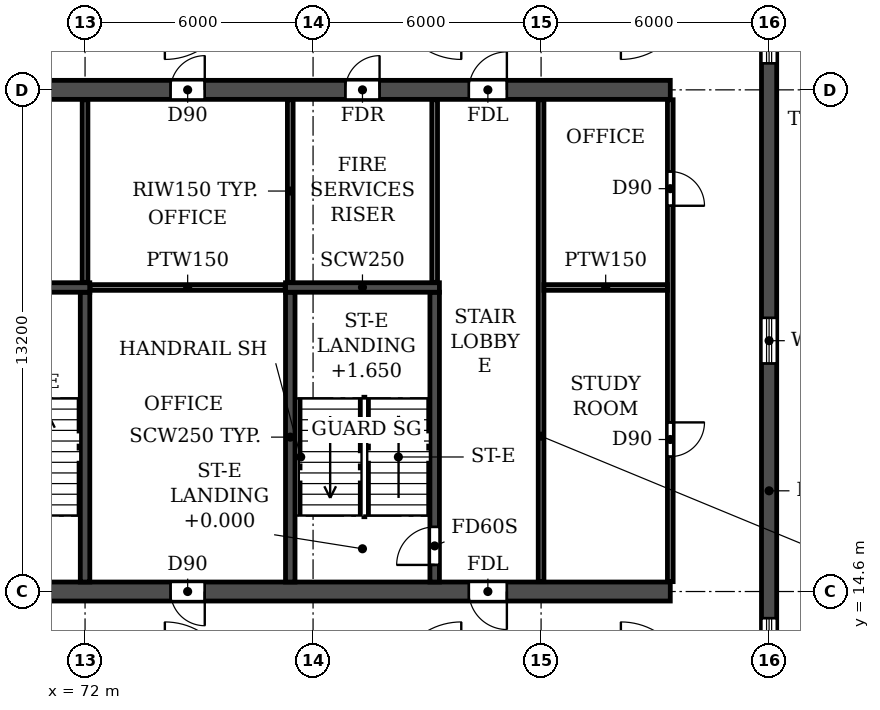
"""IFC4 building model, lengths in metres.
Left out: names, types, materials, properties, quantities, classifications, styles, units other than length and angle.
Written with IfcOpenShell. Run it as: python <this file> out.ifc"""

import sys

from ifc_helpers import new_model, si_unit, direction, frame, frame_2d, origin, place, context, subcontext, project, spatial, rectangle, extrude, element, fill, save


model = new_model("IFC4")
c1 = context("Model", 3, precision=1e-05, world=origin(), true_north=direction((0.0, 1.0)))
c2 = subcontext(c1, "Body", "Model", "MODEL_VIEW")
j1 = project(units=[si_unit("LENGTHUNIT", "METRE"), si_unit("PLANEANGLEUNIT", "RADIAN")], contexts=[c1])
p1 = place(None, origin())
s1 = spatial("IfcSite", under=j1, at=p1, CompositionType="ELEMENT")
p2 = place(p1, origin())
s2 = spatial("IfcBuilding", under=s1, at=p2, CompositionType="ELEMENT")
p3 = place(p2, frame((0.0, 0.0, 105.9)))
s3 = spatial("IfcBuildingStorey", under=s2, at=p3, CompositionType="ELEMENT", Elevation=105.9)
p4 = place(p3, frame((90.0, 4.683, 0.0), z_axis=(0.0, 0.0, 1.0), x_axis=(0.0, 1.0, 0.0)))
e1 = element("IfcWall", 1, at=p4, inside=s3, PredefinedType="SHEAR", context=c2, shape_type="SweptSolid", body=[
    extrude(rectangle(XDim=34.234, YDim=0.4, at=frame_2d((17.117, 0.0))), origin(), (0.0, 0.0, 1.0), 3.06),
])
p5 = place(p4, frame((15.917, 0.0, 0.9)))
e2 = element("IfcOpeningElement", 2, at=p5, cuts=e1, PredefinedType="OPENING", context=c2, shape_type="SweptSolid", body=[
    extrude(rectangle(XDim=1.2, YDim=1.5, at=frame_2d((0.6, 0.75))), frame((0.0, 0.21, 0.0), z_axis=(0.0, -1.0, 0.0), x_axis=(1.0, 0.0, 0.0)), (0.0, 0.0, 1.0), 0.42),
])
p6 = place(p4, frame((23.817, 0.0, 0.9)))
e3 = element("IfcOpeningElement", 3, at=p6, cuts=e1, PredefinedType="OPENING", context=c2, shape_type="SweptSolid", body=[
    extrude(rectangle(XDim=1.2, YDim=1.5, at=frame_2d((0.6, 0.75))), frame((0.0, 0.21, 0.0), z_axis=(0.0, -1.0, 0.0), x_axis=(1.0, 0.0, 0.0)), (0.0, 0.0, 1.0), 0.42),
])
p7 = place(p4, frame((8.017, 0.0, 0.9)))
e4 = element("IfcOpeningElement", 4, at=p7, cuts=e1, PredefinedType="OPENING", context=c2, shape_type="SweptSolid", body=[
    extrude(rectangle(XDim=1.2, YDim=1.5, at=frame_2d((0.6, 0.75))), frame((0.0, 0.21, 0.0), z_axis=(0.0, -1.0, 0.0), x_axis=(1.0, 0.0, 0.0)), (0.0, 0.0, 1.0), 0.42),
])
p8 = place(p4, frame((29.476, 0.0, 0.0)))
e5 = element("IfcOpeningElement", 5, at=p8, cuts=e1, PredefinedType="OPENING", context=c2, shape_type="SweptSolid", body=[
    extrude(rectangle(XDim=1.0, YDim=2.1, at=frame_2d((0.5, 1.05))), frame((0.0, 0.21, 0.0), z_axis=(0.0, -1.0, 0.0), x_axis=(1.0, 0.0, 0.0)), (0.0, 0.0, 1.0), 0.42),
])
p9 = place(p4, frame((3.159, 0.0, 0.0)))
e6 = element("IfcOpeningElement", 6, at=p9, cuts=e1, PredefinedType="OPENING", context=c2, shape_type="SweptSolid", body=[
    extrude(rectangle(XDim=1.0, YDim=2.1, at=frame_2d((0.5, 1.05))), frame((0.0, 0.21, 0.0), z_axis=(0.0, -1.0, 0.0), x_axis=(1.0, 0.0, 0.0)), (0.0, 0.0, 1.0), 0.42),
])
p10 = place(p3, frame((14.6, 14.6, 0.0), z_axis=(0.0, 0.0, 1.0), x_axis=(1.0, 0.0, 0.0)))
e7 = element("IfcWall", 7, at=p10, inside=s3, PredefinedType="SOLIDWALL", context=c2, shape_type="SweptSolid", body=[
    extrude(rectangle(XDim=72.8, YDim=0.5, at=frame_2d((36.4, 0.0))), origin(), (0.0, 0.0, 1.0), 3.06),
])
p11 = place(p10, frame((4.3, 0.0, 0.0)))
e8 = element("IfcOpeningElement", 8, at=p11, cuts=e7, PredefinedType="OPENING", context=c2, shape_type="SweptSolid", body=[
    extrude(rectangle(XDim=1.0, YDim=2.1, at=frame_2d((0.5, 1.05))), frame((0.0, 0.26, 0.0), z_axis=(0.0, -1.0, 0.0), x_axis=(1.0, 0.0, 0.0)), (0.0, 0.0, 1.0), 0.52),
])
p12 = place(p10, frame((12.25, 0.0, 0.0)))
e9 = element("IfcOpeningElement", 9, at=p12, cuts=e7, PredefinedType="OPENING", context=c2, shape_type="SweptSolid", body=[
    extrude(rectangle(XDim=0.9, YDim=2.1, at=frame_2d((0.45, 1.05))), frame((0.0, 0.26, 0.0), z_axis=(0.0, -1.0, 0.0), x_axis=(1.0, 0.0, 0.0)), (0.0, 0.0, 1.0), 0.52),
])
p13 = place(p10, frame((16.8, 0.0, 0.0)))
e10 = element("IfcOpeningElement", 10, at=p13, cuts=e7, PredefinedType="OPENING", context=c2, shape_type="SweptSolid", body=[
    extrude(rectangle(XDim=1.0, YDim=2.1, at=frame_2d((0.5, 1.05))), frame((0.0, 0.26, 0.0), z_axis=(0.0, -1.0, 0.0), x_axis=(1.0, 0.0, 0.0)), (0.0, 0.0, 1.0), 0.52),
])
p14 = place(p10, frame((30.7, 0.0, 0.0)))
e11 = element("IfcOpeningElement", 11, at=p14, cuts=e7, PredefinedType="OPENING", context=c2, shape_type="SweptSolid", body=[
    extrude(rectangle(XDim=1.0, YDim=2.1, at=frame_2d((0.5, 1.05))), frame((0.0, 0.26, 0.0), z_axis=(0.0, -1.0, 0.0), x_axis=(1.0, 0.0, 0.0)), (0.0, 0.0, 1.0), 0.52),
])
p15 = place(p10, frame((35.9, 0.0, 0.0)))
e12 = element("IfcOpeningElement", 12, at=p15, cuts=e7, PredefinedType="OPENING", context=c2, shape_type="SweptSolid", body=[
    extrude(rectangle(XDim=1.0, YDim=2.1, at=frame_2d((0.5, 1.05))), frame((0.0, 0.26, 0.0), z_axis=(0.0, -1.0, 0.0), x_axis=(1.0, 0.0, 0.0)), (0.0, 0.0, 1.0), 0.52),
])
p16 = place(p10, frame((39.8, 0.0, 0.0)))
e13 = element("IfcOpeningElement", 13, at=p16, cuts=e7, PredefinedType="OPENING", context=c2, shape_type="SweptSolid", body=[
    extrude(rectangle(XDim=1.0, YDim=2.1, at=frame_2d((0.5, 1.05))), frame((0.0, 0.26, 0.0), z_axis=(0.0, -1.0, 0.0), x_axis=(1.0, 0.0, 0.0)), (0.0, 0.0, 1.0), 0.52),
])
p17 = place(p10, frame((43.7, 0.0, 0.0)))
e14 = element("IfcOpeningElement", 14, at=p17, cuts=e7, PredefinedType="OPENING", context=c2, shape_type="SweptSolid", body=[
    extrude(rectangle(XDim=1.0, YDim=2.1, at=frame_2d((0.5, 1.05))), frame((0.0, 0.26, 0.0), z_axis=(0.0, -1.0, 0.0), x_axis=(1.0, 0.0, 0.0)), (0.0, 0.0, 1.0), 0.52),
])
p18 = place(p10, frame((55.0, 0.0, 0.0)))
e15 = element("IfcOpeningElement", 15, at=p18, cuts=e7, PredefinedType="OPENING", context=c2, shape_type="SweptSolid", body=[
    extrude(rectangle(XDim=1.0, YDim=2.1, at=frame_2d((0.5, 1.05))), frame((0.0, 0.26, 0.0), z_axis=(0.0, -1.0, 0.0), x_axis=(1.0, 0.0, 0.0)), (0.0, 0.0, 1.0), 0.52),
])
p19 = place(p10, frame((59.65, 0.0, 0.0)))
e16 = element("IfcOpeningElement", 16, at=p19, cuts=e7, PredefinedType="OPENING", context=c2, shape_type="SweptSolid", body=[
    extrude(rectangle(XDim=0.9, YDim=2.1, at=frame_2d((0.45, 1.05))), frame((0.0, 0.26, 0.0), z_axis=(0.0, -1.0, 0.0), x_axis=(1.0, 0.0, 0.0)), (0.0, 0.0, 1.0), 0.52),
])
p20 = place(p10, frame((67.5, 0.0, 0.0)))
e17 = element("IfcOpeningElement", 17, at=p20, cuts=e7, PredefinedType="OPENING", context=c2, shape_type="SweptSolid", body=[
    extrude(rectangle(XDim=1.0, YDim=2.1, at=frame_2d((0.5, 1.05))), frame((0.0, 0.26, 0.0), z_axis=(0.0, -1.0, 0.0), x_axis=(1.0, 0.0, 0.0)), (0.0, 0.0, 1.0), 0.52),
])
p21 = place(p3, frame((14.6, 27.8, 0.0), z_axis=(0.0, 0.0, 1.0), x_axis=(1.0, 0.0, 0.0)))
e18 = element("IfcWall", 18, at=p21, inside=s3, PredefinedType="SOLIDWALL", context=c2, shape_type="SweptSolid", body=[
    extrude(rectangle(XDim=72.8, YDim=0.5, at=frame_2d((36.4, 0.0))), origin(), (0.0, 0.0, 1.0), 3.06),
])
p22 = place(p21, frame((4.3, 0.0, 0.0)))
e19 = element("IfcOpeningElement", 19, at=p22, cuts=e18, PredefinedType="OPENING", context=c2, shape_type="SweptSolid", body=[
    extrude(rectangle(XDim=1.0, YDim=2.1, at=frame_2d((0.5, 1.05))), frame((0.0, 0.26, 0.0), z_axis=(0.0, -1.0, 0.0), x_axis=(1.0, 0.0, 0.0)), (0.0, 0.0, 1.0), 0.52),
])
p23 = place(p21, frame((7.65, 0.0, 0.0)))
e20 = element("IfcOpeningElement", 20, at=p23, cuts=e18, PredefinedType="OPENING", context=c2, shape_type="SweptSolid", body=[
    extrude(rectangle(XDim=0.9, YDim=2.1, at=frame_2d((0.45, 1.05))), frame((0.0, 0.26, 0.0), z_axis=(0.0, -1.0, 0.0), x_axis=(1.0, 0.0, 0.0)), (0.0, 0.0, 1.0), 0.52),
])
p24 = place(p21, frame((12.25, 0.0, 0.0)))
e21 = element("IfcOpeningElement", 21, at=p24, cuts=e18, PredefinedType="OPENING", context=c2, shape_type="SweptSolid", body=[
    extrude(rectangle(XDim=0.9, YDim=2.1, at=frame_2d((0.45, 1.05))), frame((0.0, 0.26, 0.0), z_axis=(0.0, -1.0, 0.0), x_axis=(1.0, 0.0, 0.0)), (0.0, 0.0, 1.0), 0.52),
])
p25 = place(p21, frame((16.85, 0.0, 0.0)))
e22 = element("IfcOpeningElement", 22, at=p25, cuts=e18, PredefinedType="OPENING", context=c2, shape_type="SweptSolid", body=[
    extrude(rectangle(XDim=0.9, YDim=2.1, at=frame_2d((0.45, 1.05))), frame((0.0, 0.26, 0.0), z_axis=(0.0, -1.0, 0.0), x_axis=(1.0, 0.0, 0.0)), (0.0, 0.0, 1.0), 0.52),
])
p26 = place(p21, frame((21.3, 0.0, 0.0)))
e23 = element("IfcOpeningElement", 23, at=p26, cuts=e18, PredefinedType="OPENING", context=c2, shape_type="SweptSolid", body=[
    extrude(rectangle(XDim=1.0, YDim=2.1, at=frame_2d((0.5, 1.05))), frame((0.0, 0.26, 0.0), z_axis=(0.0, -1.0, 0.0), x_axis=(1.0, 0.0, 0.0)), (0.0, 0.0, 1.0), 0.52),
])
p27 = place(p21, frame((26.25, 0.0, 0.0)))
e24 = element("IfcOpeningElement", 24, at=p27, cuts=e18, PredefinedType="OPENING", context=c2, shape_type="SweptSolid", body=[
    extrude(rectangle(XDim=1.5, YDim=2.1, at=frame_2d((0.75, 1.05))), frame((0.0, 0.26, 0.0), z_axis=(0.0, -1.0, 0.0), x_axis=(1.0, 0.0, 0.0)), (0.0, 0.0, 1.0), 0.52),
])
p28 = place(p21, frame((33.0, 0.0, 0.0)))
e25 = element("IfcOpeningElement", 25, at=p28, cuts=e18, PredefinedType="OPENING", context=c2, shape_type="SweptSolid", body=[
    extrude(rectangle(XDim=1.0, YDim=2.1, at=frame_2d((0.5, 1.05))), frame((0.0, 0.26, 0.0), z_axis=(0.0, -1.0, 0.0), x_axis=(1.0, 0.0, 0.0)), (0.0, 0.0, 1.0), 0.52),
])
p29 = place(p21, frame((35.9, 0.0, 0.0)))
e26 = element("IfcOpeningElement", 26, at=p29, cuts=e18, PredefinedType="OPENING", context=c2, shape_type="SweptSolid", body=[
    extrude(rectangle(XDim=1.0, YDim=2.1, at=frame_2d((0.5, 1.05))), frame((0.0, 0.26, 0.0), z_axis=(0.0, -1.0, 0.0), x_axis=(1.0, 0.0, 0.0)), (0.0, 0.0, 1.0), 0.52),
])
p30 = place(p21, frame((40.1, 0.0, 0.0)))
e27 = element("IfcOpeningElement", 27, at=p30, cuts=e18, PredefinedType="OPENING", context=c2, shape_type="SweptSolid", body=[
    extrude(rectangle(XDim=1.0, YDim=2.1, at=frame_2d((0.5, 1.05))), frame((0.0, 0.26, 0.0), z_axis=(0.0, -1.0, 0.0), x_axis=(1.0, 0.0, 0.0)), (0.0, 0.0, 1.0), 0.52),
])
p31 = place(p21, frame((44.0, 0.0, 0.0)))
e28 = element("IfcOpeningElement", 28, at=p31, cuts=e18, PredefinedType="OPENING", context=c2, shape_type="SweptSolid", body=[
    extrude(rectangle(XDim=1.0, YDim=2.1, at=frame_2d((0.5, 1.05))), frame((0.0, 0.26, 0.0), z_axis=(0.0, -1.0, 0.0), x_axis=(1.0, 0.0, 0.0)), (0.0, 0.0, 1.0), 0.52),
])
p32 = place(p21, frame((49.2, 0.0, 0.0)))
e29 = element("IfcOpeningElement", 29, at=p32, cuts=e18, PredefinedType="OPENING", context=c2, shape_type="SweptSolid", body=[
    extrude(rectangle(XDim=1.0, YDim=2.1, at=frame_2d((0.5, 1.05))), frame((0.0, 0.26, 0.0), z_axis=(0.0, -1.0, 0.0), x_axis=(1.0, 0.0, 0.0)), (0.0, 0.0, 1.0), 0.52),
])
p33 = place(p21, frame((55.05, 0.0, 0.0)))
e30 = element("IfcOpeningElement", 30, at=p33, cuts=e18, PredefinedType="OPENING", context=c2, shape_type="SweptSolid", body=[
    extrude(rectangle(XDim=0.9, YDim=2.1, at=frame_2d((0.45, 1.05))), frame((0.0, 0.26, 0.0), z_axis=(0.0, -1.0, 0.0), x_axis=(1.0, 0.0, 0.0)), (0.0, 0.0, 1.0), 0.52),
])
p34 = place(p21, frame((59.65, 0.0, 0.0)))
e31 = element("IfcOpeningElement", 31, at=p34, cuts=e18, PredefinedType="OPENING", context=c2, shape_type="SweptSolid", body=[
    extrude(rectangle(XDim=0.9, YDim=2.1, at=frame_2d((0.45, 1.05))), frame((0.0, 0.26, 0.0), z_axis=(0.0, -1.0, 0.0), x_axis=(1.0, 0.0, 0.0)), (0.0, 0.0, 1.0), 0.52),
])
p35 = place(p21, frame((64.25, 0.0, 0.0)))
e32 = element("IfcOpeningElement", 32, at=p35, cuts=e18, PredefinedType="OPENING", context=c2, shape_type="SweptSolid", body=[
    extrude(rectangle(XDim=0.9, YDim=2.1, at=frame_2d((0.45, 1.05))), frame((0.0, 0.26, 0.0), z_axis=(0.0, -1.0, 0.0), x_axis=(1.0, 0.0, 0.0)), (0.0, 0.0, 1.0), 0.52),
])
p36 = place(p21, frame((67.5, 0.0, 0.0)))
e33 = element("IfcOpeningElement", 33, at=p36, cuts=e18, PredefinedType="OPENING", context=c2, shape_type="SweptSolid", body=[
    extrude(rectangle(XDim=1.0, YDim=2.1, at=frame_2d((0.5, 1.05))), frame((0.0, 0.26, 0.0), z_axis=(0.0, -1.0, 0.0), x_axis=(1.0, 0.0, 0.0)), (0.0, 0.0, 1.0), 0.52),
])
p37 = place(p3, frame((72.0, 14.85, 0.0), z_axis=(0.0, 0.0, 1.0), x_axis=(0.0, 1.0, 0.0)))
e34 = element("IfcWall", 34, at=p37, inside=s3, PredefinedType="SOLIDWALL", context=c2, shape_type="SweptSolid", body=[
    extrude(rectangle(XDim=7.625, YDim=0.25, at=frame_2d((3.812, 0.0))), origin(), (0.0, 0.0, 1.0), 3.06),
])
p38 = place(p3, frame((68.075, 22.6, 0.0), z_axis=(0.0, 0.0, 1.0), x_axis=(1.0, 0.0, 0.0)))
e35 = element("IfcWall", 35, at=p38, inside=s3, PredefinedType="SOLIDWALL", context=c2, shape_type="SweptSolid", body=[
    extrude(rectangle(XDim=4.05, YDim=0.25, at=frame_2d((2.025, 0.0))), origin(), (0.0, 0.0, 1.0), 3.06),
])
p39 = place(p3, frame((77.4, 14.85, 0.0), z_axis=(0.0, 0.0, 1.0), x_axis=(0.0, 1.0, 0.0)))
e36 = element("IfcWall", 36, at=p39, inside=s3, PredefinedType="SOLIDWALL", context=c2, shape_type="SweptSolid", body=[
    extrude(rectangle(XDim=7.625, YDim=0.25, at=frame_2d((3.812, 0.0))), origin(), (0.0, 0.0, 1.0), 3.06),
])
p40 = place(p3, frame((81.2, 14.85, 0.0), z_axis=(0.0, 0.0, 1.0), x_axis=(0.0, 1.0, 0.0)))
e37 = element("IfcWall", 37, at=p40, inside=s3, PredefinedType="SOLIDWALL", context=c2, shape_type="SweptSolid", body=[
    extrude(rectangle(XDim=7.625, YDim=0.25, at=frame_2d((3.812, 0.0))), origin(), (0.0, 0.0, 1.0), 3.06),
])
p41 = place(p40, frame((0.45, 0.0, 0.0)))
e38 = element("IfcOpeningElement", 38, at=p41, cuts=e37, PredefinedType="OPENING", context=c2, shape_type="SweptSolid", body=[
    extrude(rectangle(XDim=1.0, YDim=2.1, at=frame_2d((0.5, 1.05))), frame((0.0, 0.135, 0.0), z_axis=(0.0, -1.0, 0.0), x_axis=(1.0, 0.0, 0.0)), (0.0, 0.0, 1.0), 0.27),
])
p42 = place(p3, frame((77.275, 22.6, 0.0), z_axis=(0.0, 0.0, 1.0), x_axis=(1.0, 0.0, 0.0)))
e39 = element("IfcWall", 39, at=p42, inside=s3, PredefinedType="SOLIDWALL", context=c2, shape_type="SweptSolid", body=[
    extrude(rectangle(XDim=4.05, YDim=0.25, at=frame_2d((2.025, 0.0))), origin(), (0.0, 0.0, 1.0), 3.06),
])
p43 = place(p3, frame((84.0, 14.86, 0.0), z_axis=(0.0, 0.0, 1.0), x_axis=(0.0, 1.0, 0.0)))
e40 = element("IfcWall", 40, at=p43, inside=s3, PredefinedType="PARTITIONING", context=c2, shape_type="SweptSolid", body=[
    extrude(rectangle(XDim=12.68, YDim=0.15, at=frame_2d((6.34, 0.0))), origin(), (0.0, 0.0, 1.0), 3.06),
])
p44 = place(p3, frame((87.4, 14.86, 0.0), z_axis=(0.0, 0.0, 1.0), x_axis=(0.0, 1.0, 0.0)))
e41 = element("IfcWall", 41, at=p44, inside=s3, PredefinedType="PARTITIONING", context=c2, shape_type="SweptSolid", body=[
    extrude(rectangle(XDim=12.68, YDim=0.15, at=frame_2d((6.34, 0.0))), origin(), (0.0, 0.0, 1.0), 3.06),
])
p45 = place(p44, frame((3.29, 0.0, 0.0)))
e42 = element("IfcOpeningElement", 42, at=p45, cuts=e41, PredefinedType="OPENING", context=c2, shape_type="SweptSolid", body=[
    extrude(rectangle(XDim=0.9, YDim=2.1, at=frame_2d((0.45, 1.05))), frame((0.0, 0.085, 0.0), z_axis=(0.0, -1.0, 0.0), x_axis=(1.0, 0.0, 0.0)), (0.0, 0.0, 1.0), 0.17),
])
p46 = place(p44, frame((9.89, 0.0, 0.0)))
e43 = element("IfcOpeningElement", 43, at=p46, cuts=e41, PredefinedType="OPENING", context=c2, shape_type="SweptSolid", body=[
    extrude(rectangle(XDim=0.9, YDim=2.1, at=frame_2d((0.45, 1.05))), frame((0.0, 0.085, 0.0), z_axis=(0.0, -1.0, 0.0), x_axis=(1.0, 0.0, 0.0)), (0.0, 0.0, 1.0), 0.17),
])
p47 = place(p3, frame((72.135, 22.6, 0.0), z_axis=(0.0, 0.0, 1.0), x_axis=(1.0, 0.0, 0.0)))
e44 = element("IfcWall", 44, at=p47, inside=s3, PredefinedType="PARTITIONING", context=c2, shape_type="SweptSolid", body=[
    extrude(rectangle(XDim=5.13, YDim=0.15, at=frame_2d((2.565, 0.0))), origin(), (0.0, 0.0, 1.0), 3.06),
])
p48 = place(p3, frame((84.075, 22.6, 0.0), z_axis=(0.0, 0.0, 1.0), x_axis=(1.0, 0.0, 0.0)))
e45 = element("IfcWall", 45, at=p48, inside=s3, PredefinedType="PARTITIONING", context=c2, shape_type="SweptSolid", body=[
    extrude(rectangle(XDim=3.25, YDim=0.15, at=frame_2d((1.625, 0.0))), origin(), (0.0, 0.0, 1.0), 3.06),
])
for number, where, z_axis, x_axis in (
    (46, (72.0, 22.735, 0.0), (0.0, 0.0, 1.0), (0.0, 1.0, 0.0)),
    (47, (77.4, 22.735, 0.0), (0.0, 0.0, 1.0), (0.0, 1.0, 0.0)),
    (48, (81.2, 22.735, 0.0), (0.0, 0.0, 1.0), (0.0, 1.0, 0.0)),
):
    element("IfcWall", number, at=place(p3, frame(where, z_axis=z_axis, x_axis=x_axis)), inside=s3, PredefinedType="PARTITIONING", context=c2, shape_type="SweptSolid", body=[
        extrude(rectangle(XDim=4.805, YDim=0.15, at=frame_2d((2.402, 0.0))), origin(), (0.0, 0.0, 1.0), 3.06),
    ])
p49 = place(p5, origin())
e49 = element("IfcWindow", 49, at=p49, inside=s3, PartitioningType="SINGLE_PANEL", PredefinedType="WINDOW", context=c2, shape_type="SweptSolid", body=[
    extrude(rectangle(XDim=1.2, YDim=1.5, at=frame_2d((0.6, 0.75))), frame((0.0, 0.03, 0.0), z_axis=(0.0, -1.0, 0.0), x_axis=(1.0, 0.0, 0.0)), (0.0, 0.0, 1.0), 0.06),
])
fill(e2, e49)
p50 = place(p6, origin())
e50 = element("IfcWindow", 50, at=p50, inside=s3, PartitioningType="SINGLE_PANEL", PredefinedType="WINDOW", context=c2, shape_type="SweptSolid", body=[
    extrude(rectangle(XDim=1.2, YDim=1.5, at=frame_2d((0.6, 0.75))), frame((0.0, 0.03, 0.0), z_axis=(0.0, -1.0, 0.0), x_axis=(1.0, 0.0, 0.0)), (0.0, 0.0, 1.0), 0.06),
])
fill(e3, e50)
p51 = place(p7, origin())
e51 = element("IfcWindow", 51, at=p51, inside=s3, PartitioningType="SINGLE_PANEL", PredefinedType="WINDOW", context=c2, shape_type="SweptSolid", body=[
    extrude(rectangle(XDim=1.2, YDim=1.5, at=frame_2d((0.6, 0.75))), frame((0.0, 0.03, 0.0), z_axis=(0.0, -1.0, 0.0), x_axis=(1.0, 0.0, 0.0)), (0.0, 0.0, 1.0), 0.06),
])
fill(e4, e51)
p52 = place(p45, frame((0.9, 0.0, 0.0), z_axis=(0.0, 0.0, 1.0), x_axis=(-1.0, 0.0, 0.0)))
e52 = element("IfcDoor", 52, at=p52, inside=s3, OperationType="SINGLE_SWING_LEFT", PredefinedType="DOOR", context=c2, shape_type="SweptSolid", body=[
    extrude(rectangle(XDim=0.9, YDim=2.1, at=frame_2d((0.45, 1.05))), frame((0.0, 0.025, 0.0), z_axis=(0.0, -1.0, 0.0), x_axis=(1.0, 0.0, 0.0)), (0.0, 0.0, 1.0), 0.05),
])
fill(e42, e52)
p53 = place(p46, frame((0.9, 0.0, 0.0), z_axis=(0.0, 0.0, 1.0), x_axis=(-1.0, 0.0, 0.0)))
e53 = element("IfcDoor", 53, at=p53, inside=s3, OperationType="SINGLE_SWING_RIGHT", PredefinedType="DOOR", context=c2, shape_type="SweptSolid", body=[
    extrude(rectangle(XDim=0.9, YDim=2.1, at=frame_2d((0.45, 1.05))), frame((0.0, 0.025, 0.0), z_axis=(0.0, -1.0, 0.0), x_axis=(1.0, 0.0, 0.0)), (0.0, 0.0, 1.0), 0.05),
])
fill(e43, e53)
p54 = place(p34, origin())
e54 = element("IfcDoor", 54, at=p54, inside=s3, OperationType="SINGLE_SWING_RIGHT", PredefinedType="DOOR", context=c2, shape_type="SweptSolid", body=[
    extrude(rectangle(XDim=0.9, YDim=2.1, at=frame_2d((0.45, 1.05))), frame((0.0, 0.025, 0.0), z_axis=(0.0, -1.0, 0.0), x_axis=(1.0, 0.0, 0.0)), (0.0, 0.0, 1.0), 0.05),
])
fill(e31, e54)
p55 = place(p35, origin())
e55 = element("IfcDoor", 55, at=p55, inside=s3, OperationType="SINGLE_SWING_RIGHT", PredefinedType="DOOR", context=c2, shape_type="SweptSolid", body=[
    extrude(rectangle(XDim=0.9, YDim=2.1, at=frame_2d((0.45, 1.05))), frame((0.0, 0.025, 0.0), z_axis=(0.0, -1.0, 0.0), x_axis=(1.0, 0.0, 0.0)), (0.0, 0.0, 1.0), 0.05),
])
fill(e32, e55)
p56 = place(p36, origin())
e56 = element("IfcDoor", 56, at=p56, inside=s3, OperationType="SINGLE_SWING_RIGHT", PredefinedType="DOOR", context=c2, shape_type="SweptSolid", body=[
    extrude(rectangle(XDim=1.0, YDim=2.1, at=frame_2d((0.5, 1.05))), frame((0.0, 0.025, 0.0), z_axis=(0.0, -1.0, 0.0), x_axis=(1.0, 0.0, 0.0)), (0.0, 0.0, 1.0), 0.05),
])
fill(e33, e56)
p57 = place(p19, frame((0.9, 0.0, 0.0), z_axis=(0.0, 0.0, 1.0), x_axis=(-1.0, 0.0, 0.0)))
e57 = element("IfcDoor", 57, at=p57, inside=s3, OperationType="SINGLE_SWING_LEFT", PredefinedType="DOOR", context=c2, shape_type="SweptSolid", body=[
    extrude(rectangle(XDim=0.9, YDim=2.1, at=frame_2d((0.45, 1.05))), frame((0.0, 0.025, 0.0), z_axis=(0.0, -1.0, 0.0), x_axis=(1.0, 0.0, 0.0)), (0.0, 0.0, 1.0), 0.05),
])
fill(e16, e57)
p58 = place(p20, frame((1.0, 0.0, 0.0), z_axis=(0.0, 0.0, 1.0), x_axis=(-1.0, 0.0, 0.0)))
e58 = element("IfcDoor", 58, at=p58, inside=s3, OperationType="SINGLE_SWING_LEFT", PredefinedType="DOOR", context=c2, shape_type="SweptSolid", body=[
    extrude(rectangle(XDim=1.0, YDim=2.1, at=frame_2d((0.5, 1.05))), frame((0.0, 0.025, 0.0), z_axis=(0.0, -1.0, 0.0), x_axis=(1.0, 0.0, 0.0)), (0.0, 0.0, 1.0), 0.05),
])
fill(e17, e58)
p59 = place(p41, origin())
e59 = element("IfcDoor", 59, at=p59, inside=s3, OperationType="SINGLE_SWING_LEFT", PredefinedType="DOOR", context=c2, shape_type="SweptSolid", body=[
    extrude(rectangle(XDim=1.0, YDim=2.1, at=frame_2d((0.5, 1.05))), frame((0.0, 0.025, 0.0), z_axis=(0.0, -1.0, 0.0), x_axis=(1.0, 0.0, 0.0)), (0.0, 0.0, 1.0), 0.05),
])
fill(e38, e59)
save(model, sys.argv[1])
